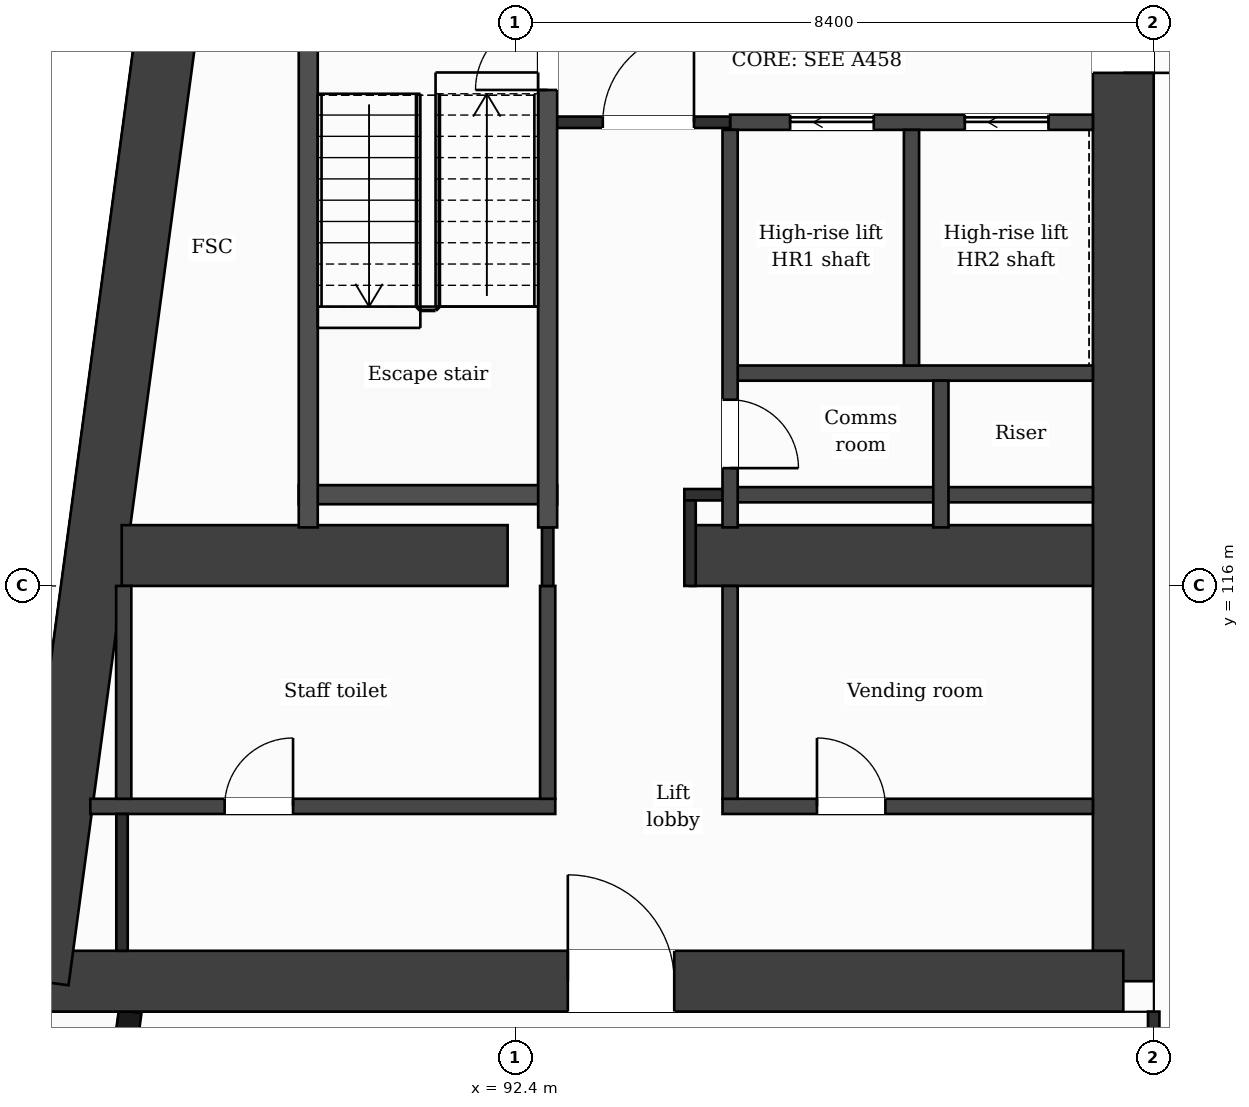
"""IFC4 building model, lengths in metres.
Left out: names, types, materials, properties, quantities, classifications, styles, units other than length and angle.
Written with IfcOpenShell. Run it as: python <this file> out.ifc"""

import sys

from ifc_helpers import new_model, si_unit, direction, frame, frame_2d, origin, place, context, subcontext, project, spatial, rectangle, extrude, element, fill, save


model = new_model("IFC4")
c1 = context("Model", 3, precision=1e-05, world=origin(), true_north=direction((0.0, 1.0)))
c2 = subcontext(c1, "Body", "Model", "MODEL_VIEW")
j1 = project(units=[si_unit("LENGTHUNIT", "METRE"), si_unit("PLANEANGLEUNIT", "RADIAN")], contexts=[c1])
p1 = place(None, origin())
s1 = spatial("IfcSite", under=j1, at=p1, CompositionType="ELEMENT")
p2 = place(p1, origin())
s2 = spatial("IfcBuilding", under=s1, at=p2, CompositionType="ELEMENT")
p3 = place(p2, frame((0.0, 0.0, 235.5)))
s3 = spatial("IfcBuildingStorey", under=s2, at=p3, CompositionType="ELEMENT", Elevation=235.5)
p4 = place(p3, frame((100.4, 132.0, 0.0), z_axis=(0.0, 0.0, 1.0), x_axis=(0.0, -1.0, 0.0)))
e1 = element("IfcWall", 1, at=p4, inside=s3, PredefinedType="SHEAR", context=c2, shape_type="SweptSolid", body=[
    extrude(rectangle(XDim=21.2, YDim=0.8, at=frame_2d((10.6, 0.0))), origin(), (0.0, 0.0, 1.0), 3.7),
])
p5 = place(p4, frame((7.85, 0.0, 0.0)))
e2 = element("IfcOpeningElement", 2, at=p5, cuts=e1, PredefinedType="OPENING", context=c2, shape_type="SweptSolid", body=[
    extrude(rectangle(XDim=1.4, YDim=2.1, at=frame_2d((0.7, 1.05))), frame((0.0, 0.41, 0.0), z_axis=(0.0, -1.0, 0.0), x_axis=(1.0, 0.0, 0.0)), (0.0, 0.0, 1.0), 0.82),
])
p6 = place(p3, frame((100.4, 110.8, 0.0), z_axis=(0.0, 0.0, 1.0), x_axis=(-1.0, 0.0, 0.0)))
e3 = element("IfcWall", 3, at=p6, inside=s3, PredefinedType="SHEAR", context=c2, shape_type="SweptSolid", body=[
    extrude(rectangle(XDim=14.273, YDim=0.8, at=frame_2d((7.137, 0.0))), origin(), (0.0, 0.0, 1.0), 3.7),
])
p7 = place(p6, frame((5.908, 0.0, 0.0)))
e4 = element("IfcOpeningElement", 4, at=p7, cuts=e3, PredefinedType="OPENING", context=c2, shape_type="SweptSolid", body=[
    extrude(rectangle(XDim=1.4, YDim=2.1, at=frame_2d((0.7, 1.05))), frame((0.0, 0.41, 0.0), z_axis=(0.0, -1.0, 0.0), x_axis=(1.0, 0.0, 0.0)), (0.0, 0.0, 1.0), 0.82),
])
p8 = place(p3, frame((86.127, 110.8, 0.0), z_axis=(0.0, 0.0, 1.0), x_axis=(0.133408347329, 0.991061154956, 0.0)))
e5 = element("IfcWall", 5, at=p8, inside=s3, PredefinedType="SHEAR", context=c2, shape_type="SweptSolid", body=[
    extrude(rectangle(XDim=21.391, YDim=0.8, at=frame_2d((10.696, 0.0))), origin(), (0.0, 0.0, 1.0), 3.7),
])
p9 = place(p3, frame((87.223, 116.4, 0.0), z_axis=(0.0, 0.0, 1.0), x_axis=(1.0, 0.0, 0.0)))
e6 = element("IfcWall", 6, at=p9, inside=s3, PredefinedType="SHEAR", context=c2, shape_type="SweptSolid", body=[
    extrude(rectangle(XDim=5.077, YDim=0.8, at=frame_2d((2.539, 0.0))), origin(), (0.0, 0.0, 1.0), 3.7),
])
p10 = place(p3, frame((94.7, 116.4, 0.0), z_axis=(0.0, 0.0, 1.0), x_axis=(1.0, 0.0, 0.0)))
e7 = element("IfcWall", 7, at=p10, inside=s3, PredefinedType="SHEAR", context=c2, shape_type="SweptSolid", body=[
    extrude(rectangle(XDim=5.3, YDim=0.8, at=frame_2d((2.65, 0.0))), origin(), (0.0, 0.0, 1.0), 3.7),
])
p11 = place(p3, frame((87.334, 110.4, 0.0), z_axis=(0.0, 0.0, 1.0), x_axis=(-0.133437175554, -0.991057273915, 0.0)))
e8 = element("IfcWall", 8, at=p11, inside=s3, PredefinedType="SOLIDWALL", context=c2, shape_type="SweptSolid", body=[
    extrude(rectangle(XDim=6.781, YDim=0.3, at=frame_2d((3.39, 0.0))), origin(), (0.0, 0.0, 1.0), 3.38),
])
p12 = place(p11, frame((1.418, 0.0, 0.0)))
e9 = element("IfcOpeningElement", 9, at=p12, cuts=e8, PredefinedType="OPENING", context=c2, shape_type="SweptSolid", body=[
    extrude(rectangle(XDim=1.2, YDim=2.4, at=frame_2d((0.6, 1.2))), frame((0.0, 0.16, 0.0), z_axis=(0.0, -1.0, 0.0), x_axis=(1.0, 0.0, 0.0)), (0.0, 0.0, 1.0), 0.32),
])
p13 = place(p11, frame((4.758, 0.0, 0.9)))
e10 = element("IfcOpeningElement", 10, at=p13, cuts=e8, PredefinedType="OPENING", context=c2, shape_type="SweptSolid", body=[
    extrude(rectangle(XDim=1.2, YDim=2.1, at=frame_2d((0.6, 1.05))), frame((0.0, 0.16, 0.0), z_axis=(0.0, -1.0, 0.0), x_axis=(1.0, 0.0, 0.0)), (0.0, 0.0, 1.0), 0.32),
])
p14 = place(p3, frame((86.81, 113.1, 0.0), z_axis=(0.0, 0.0, 1.0), x_axis=(1.0, 0.0, 0.0)))
e11 = element("IfcWall", 11, at=p14, inside=s3, PredefinedType="PARTITIONING", context=c2, shape_type="SweptSolid", body=[
    extrude(rectangle(XDim=6.117, YDim=0.2, at=frame_2d((3.059, 0.0))), origin(), (0.0, 0.0, 1.0), 3.38),
])
p15 = place(p14, frame((1.767, 0.0, 0.0)))
e12 = element("IfcOpeningElement", 12, at=p15, cuts=e11, PredefinedType="OPENING", context=c2, shape_type="SweptSolid", body=[
    extrude(rectangle(XDim=0.9, YDim=2.1, at=frame_2d((0.45, 1.05))), frame((0.0, 0.11, 0.0), z_axis=(0.0, -1.0, 0.0), x_axis=(1.0, 0.0, 0.0)), (0.0, 0.0, 1.0), 0.22),
])
p16 = place(p3, frame((95.127, 113.1, 0.0), z_axis=(0.0, 0.0, 1.0), x_axis=(1.0, 0.0, 0.0)))
e13 = element("IfcWall", 13, at=p16, inside=s3, PredefinedType="PARTITIONING", context=c2, shape_type="SweptSolid", body=[
    extrude(rectangle(XDim=4.873, YDim=0.2, at=frame_2d((2.437, 0.0))), origin(), (0.0, 0.0, 1.0), 3.38),
])
p17 = place(p16, frame((1.243, 0.0, 0.0)))
e14 = element("IfcOpeningElement", 14, at=p17, cuts=e13, PredefinedType="OPENING", context=c2, shape_type="SweptSolid", body=[
    extrude(rectangle(XDim=0.9, YDim=2.1, at=frame_2d((0.45, 1.05))), frame((0.0, 0.11, 0.0), z_axis=(0.0, -1.0, 0.0), x_axis=(1.0, 0.0, 0.0)), (0.0, 0.0, 1.0), 0.22),
])
p18 = place(p3, frame((95.227, 117.2, 0.0), z_axis=(0.0, 0.0, 1.0), x_axis=(1.0, 0.0, 0.0)))
e15 = element("IfcWall", 15, at=p18, inside=s3, PredefinedType="PARTITIONING", context=c2, shape_type="SweptSolid", body=[
    extrude(rectangle(XDim=4.773, YDim=0.2, at=frame_2d((2.386, 0.0))), origin(), (0.0, 0.0, 1.0), 3.38),
])
p19 = place(p3, frame((94.625, 117.2, 0.0), z_axis=(0.0, 0.0, 1.0), x_axis=(1.0, 0.0, 0.0)))
e16 = element("IfcWall", 16, at=p19, inside=s3, PredefinedType="PARTITIONING", context=c2, shape_type="SweptSolid", body=[
    extrude(rectangle(XDim=0.602, YDim=0.15, at=frame_2d((0.301, 0.0))), origin(), (0.0, 0.0, 1.0), 3.38),
])
p20 = place(p3, frame((89.552, 117.2, 0.0), z_axis=(0.0, 0.0, 1.0), x_axis=(1.0, 0.0, 0.0)))
e17 = element("IfcWall", 17, at=p20, inside=s3, PredefinedType="PARTITIONING", context=c2, shape_type="SweptSolid", body=[
    extrude(rectangle(XDim=3.4, YDim=0.25, at=frame_2d((1.7, 0.0))), origin(), (0.0, 0.0, 1.0), 3.38),
])
p21 = place(p3, frame((95.227, 118.8, 0.0), z_axis=(0.0, 0.0, 1.0), x_axis=(1.0, 0.0, 0.0)))
e18 = element("IfcWall", 18, at=p21, inside=s3, PredefinedType="PARTITIONING", context=c2, shape_type="SweptSolid", body=[
    extrude(rectangle(XDim=4.773, YDim=0.2, at=frame_2d((2.386, 0.0))), origin(), (0.0, 0.0, 1.0), 3.38),
])
p22 = place(p3, frame((95.227, 122.1, 0.0), z_axis=(0.0, 0.0, 1.0), x_axis=(1.0, 0.0, 0.0)))
e19 = element("IfcWall", 19, at=p22, inside=s3, PredefinedType="PARTITIONING", context=c2, shape_type="SweptSolid", body=[
    extrude(rectangle(XDim=4.773, YDim=0.2, at=frame_2d((2.386, 0.0))), origin(), (0.0, 0.0, 1.0), 3.38),
])
p23 = place(p22, frame((0.79, 0.0, 0.0)))
e20 = element("IfcOpeningElement", 20, at=p23, cuts=e19, PredefinedType="OPENING", context=c2, shape_type="SweptSolid", body=[
    extrude(rectangle(XDim=1.1, YDim=2.1, at=frame_2d((0.55, 1.05))), frame((0.0, 0.11, 0.0), z_axis=(0.0, -1.0, 0.0), x_axis=(1.0, 0.0, 0.0)), (0.0, 0.0, 1.0), 0.22),
])
p24 = place(p22, frame((3.088, 0.0, 0.0)))
e21 = element("IfcOpeningElement", 21, at=p24, cuts=e19, PredefinedType="OPENING", context=c2, shape_type="SweptSolid", body=[
    extrude(rectangle(XDim=1.1, YDim=2.1, at=frame_2d((0.55, 1.05))), frame((0.0, 0.11, 0.0), z_axis=(0.0, -1.0, 0.0), x_axis=(1.0, 0.0, 0.0)), (0.0, 0.0, 1.0), 0.22),
])
p25 = place(p3, frame((92.827, 122.1, 0.0), z_axis=(0.0, 0.0, 1.0), x_axis=(1.0, 0.0, 0.0)))
e22 = element("IfcWall", 22, at=p25, inside=s3, PredefinedType="PARTITIONING", context=c2, shape_type="SweptSolid", body=[
    extrude(rectangle(XDim=2.4, YDim=0.15, at=frame_2d((1.2, 0.0))), origin(), (0.0, 0.0, 1.0), 3.38),
])
p26 = place(p25, frame((0.725, 0.0, 0.0)))
e23 = element("IfcOpeningElement", 23, at=p26, cuts=e22, PredefinedType="OPENING", context=c2, shape_type="SweptSolid", body=[
    extrude(rectangle(XDim=1.2, YDim=2.1, at=frame_2d((0.6, 1.05))), frame((0.0, 0.085, 0.0), z_axis=(0.0, -1.0, 0.0), x_axis=(1.0, 0.0, 0.0)), (0.0, 0.0, 1.0), 0.17),
])
p27 = place(p3, frame((87.25, 113.2, 0.0), z_axis=(0.0, 0.0, 1.0), x_axis=(0.0, 1.0, 0.0)))
e24 = element("IfcWall", 24, at=p27, inside=s3, PredefinedType="PARTITIONING", context=c2, shape_type="SweptSolid", body=[
    extrude(rectangle(XDim=2.8, YDim=0.2, at=frame_2d((1.4, 0.0))), origin(), (0.0, 0.0, 1.0), 3.38),
])
p28 = place(p3, frame((87.227, 111.2, 0.0), z_axis=(0.0, 0.0, 1.0), x_axis=(0.0, 1.0, 0.0)))
e25 = element("IfcWall", 25, at=p28, inside=s3, PredefinedType="PARTITIONING", context=c2, shape_type="SweptSolid", body=[
    extrude(rectangle(XDim=1.8, YDim=0.15, at=frame_2d((0.9, 0.0))), origin(), (0.0, 0.0, 1.0), 3.38),
])
p29 = place(p3, frame((89.677, 116.77, 0.0), z_axis=(0.0, 0.0, 1.0), x_axis=(0.0, 1.0, 0.0)))
e26 = element("IfcWall", 26, at=p29, inside=s3, PredefinedType="PARTITIONING", context=c2, shape_type="SweptSolid", body=[
    extrude(rectangle(XDim=7.055, YDim=0.25, at=frame_2d((3.527, 0.0))), origin(), (0.0, 0.0, 1.0), 3.38),
])
p30 = place(p3, frame((92.827, 113.2, 0.0), z_axis=(0.0, 0.0, 1.0), x_axis=(0.0, 1.0, 0.0)))
e27 = element("IfcWall", 27, at=p30, inside=s3, PredefinedType="PARTITIONING", context=c2, shape_type="SweptSolid", body=[
    extrude(rectangle(XDim=2.8, YDim=0.2, at=frame_2d((1.4, 0.0))), origin(), (0.0, 0.0, 1.0), 3.38),
])
p31 = place(p3, frame((92.827, 116.0, 0.0), z_axis=(0.0, 0.0, 1.0), x_axis=(0.0, 1.0, 0.0)))
e28 = element("IfcWall", 28, at=p31, inside=s3, PredefinedType="PARTITIONING", context=c2, shape_type="SweptSolid", body=[
    extrude(rectangle(XDim=0.77, YDim=0.15, at=frame_2d((0.385, 0.0))), origin(), (0.0, 0.0, 1.0), 3.38),
])
p32 = place(p3, frame((92.827, 116.77, 0.0), z_axis=(0.0, 0.0, 1.0), x_axis=(0.0, 1.0, 0.0)))
e29 = element("IfcWall", 29, at=p32, inside=s3, PredefinedType="PARTITIONING", context=c2, shape_type="SweptSolid", body=[
    extrude(rectangle(XDim=7.055, YDim=0.25, at=frame_2d((3.527, 0.0))), origin(), (0.0, 0.0, 1.0), 3.38),
])
p33 = place(p32, frame((5.755, 0.0, 0.0)))
e30 = element("IfcOpeningElement", 30, at=p33, cuts=e29, PredefinedType="OPENING", context=c2, shape_type="SweptSolid", body=[
    extrude(rectangle(XDim=0.95, YDim=2.1, at=frame_2d((0.475, 1.05))), frame((0.0, 0.135, 0.0), z_axis=(0.0, -1.0, 0.0), x_axis=(1.0, 0.0, 0.0)), (0.0, 0.0, 1.0), 0.27),
])
p34 = place(p3, frame((94.7, 116.0, 0.0), z_axis=(0.0, 0.0, 1.0), x_axis=(0.0, 1.0, 0.0)))
e31 = element("IfcWall", 31, at=p34, inside=s3, PredefinedType="PARTITIONING", context=c2, shape_type="SweptSolid", body=[
    extrude(rectangle(XDim=1.125, YDim=0.15, at=frame_2d((0.562, 0.0))), origin(), (0.0, 0.0, 1.0), 3.38),
])
p35 = place(p3, frame((95.227, 113.2, 0.0), z_axis=(0.0, 0.0, 1.0), x_axis=(0.0, 1.0, 0.0)))
e32 = element("IfcWall", 32, at=p35, inside=s3, PredefinedType="PARTITIONING", context=c2, shape_type="SweptSolid", body=[
    extrude(rectangle(XDim=2.8, YDim=0.2, at=frame_2d((1.4, 0.0))), origin(), (0.0, 0.0, 1.0), 3.38),
])
p36 = place(p3, frame((95.227, 116.77, 0.0), z_axis=(0.0, 0.0, 1.0), x_axis=(0.0, 1.0, 0.0)))
e33 = element("IfcWall", 33, at=p36, inside=s3, PredefinedType="PARTITIONING", context=c2, shape_type="SweptSolid", body=[
    extrude(rectangle(XDim=5.23, YDim=0.2, at=frame_2d((2.615, 0.0))), origin(), (0.0, 0.0, 1.0), 3.38),
])
p37 = place(p36, frame((0.78, 0.0, 0.0)))
e34 = element("IfcOpeningElement", 34, at=p37, cuts=e33, PredefinedType="OPENING", context=c2, shape_type="SweptSolid", body=[
    extrude(rectangle(XDim=0.9, YDim=2.1, at=frame_2d((0.45, 1.05))), frame((0.0, 0.11, 0.0), z_axis=(0.0, -1.0, 0.0), x_axis=(1.0, 0.0, 0.0)), (0.0, 0.0, 1.0), 0.22),
])
p38 = place(p3, frame((97.614, 118.9, 0.0), z_axis=(0.0, 0.0, 1.0), x_axis=(0.0, 1.0, 0.0)))
e35 = element("IfcWall", 35, at=p38, inside=s3, PredefinedType="PARTITIONING", context=c2, shape_type="SweptSolid", body=[
    extrude(rectangle(XDim=3.1, YDim=0.2, at=frame_2d((1.55, 0.0))), origin(), (0.0, 0.0, 1.0), 3.38),
])
p39 = place(p3, frame((98.0, 116.77, 0.0), z_axis=(0.0, 0.0, 1.0), x_axis=(0.0, 1.0, 0.0)))
e36 = element("IfcWall", 36, at=p39, inside=s3, PredefinedType="PARTITIONING", context=c2, shape_type="SweptSolid", body=[
    extrude(rectangle(XDim=1.93, YDim=0.2, at=frame_2d((0.965, 0.0))), origin(), (0.0, 0.0, 1.0), 3.38),
])
p40 = place(p3, frame((100.8, 109.075, 0.0), z_axis=(0.0, 0.0, 1.0), x_axis=(0.0, 1.0, 0.0)))
e37 = element("IfcWall", 37, at=p40, inside=s3, PredefinedType="PARTITIONING", context=c2, shape_type="SweptSolid", body=[
    extrude(rectangle(XDim=1.325, YDim=0.15, at=frame_2d((0.663, 0.0))), origin(), (0.0, 0.0, 1.0), 3.38),
])
p41 = place(p26, origin())
e38 = element("IfcDoor", 38, at=p41, inside=s3, OperationType="SINGLE_SWING_RIGHT", PredefinedType="DOOR", context=c2, shape_type="SweptSolid", body=[
    extrude(rectangle(XDim=1.2, YDim=2.1, at=frame_2d((0.6, 1.05))), frame((0.0, 0.025, 0.0), z_axis=(0.0, -1.0, 0.0), x_axis=(1.0, 0.0, 0.0)), (0.0, 0.0, 1.0), 0.05),
])
fill(e23, e38)
p42 = place(p23, origin())
e39 = element("IfcDoor", 39, at=p42, inside=s3, OperationType="SLIDING_TO_LEFT", PredefinedType="DOOR", context=c2, shape_type="SweptSolid", body=[
    extrude(rectangle(XDim=1.1, YDim=2.1, at=frame_2d((0.55, 1.05))), frame((0.0, 0.025, 0.0), z_axis=(0.0, -1.0, 0.0), x_axis=(1.0, 0.0, 0.0)), (0.0, 0.0, 1.0), 0.05),
])
fill(e20, e39)
p43 = place(p24, origin())
e40 = element("IfcDoor", 40, at=p43, inside=s3, OperationType="SLIDING_TO_LEFT", PredefinedType="DOOR", context=c2, shape_type="SweptSolid", body=[
    extrude(rectangle(XDim=1.1, YDim=2.1, at=frame_2d((0.55, 1.05))), frame((0.0, 0.025, 0.0), z_axis=(0.0, -1.0, 0.0), x_axis=(1.0, 0.0, 0.0)), (0.0, 0.0, 1.0), 0.05),
])
fill(e21, e40)
p44 = place(p33, origin())
e41 = element("IfcDoor", 41, at=p44, inside=s3, OperationType="SINGLE_SWING_LEFT", PredefinedType="DOOR", context=c2, shape_type="SweptSolid", body=[
    extrude(rectangle(XDim=0.95, YDim=2.1, at=frame_2d((0.475, 1.05))), frame((0.0, 0.025, 0.0), z_axis=(0.0, -1.0, 0.0), x_axis=(1.0, 0.0, 0.0)), (0.0, 0.0, 1.0), 0.05),
])
fill(e30, e41)
p45 = place(p37, origin())
e42 = element("IfcDoor", 42, at=p45, inside=s3, OperationType="SINGLE_SWING_LEFT", PredefinedType="DOOR", context=c2, shape_type="SweptSolid", body=[
    extrude(rectangle(XDim=0.9, YDim=2.1, at=frame_2d((0.45, 1.05))), frame((0.0, 0.025, 0.0), z_axis=(0.0, -1.0, 0.0), x_axis=(1.0, 0.0, 0.0)), (0.0, 0.0, 1.0), 0.05),
])
fill(e34, e42)
p46 = place(p15, origin())
e43 = element("IfcDoor", 43, at=p46, inside=s3, OperationType="SINGLE_SWING_RIGHT", PredefinedType="DOOR", context=c2, shape_type="SweptSolid", body=[
    extrude(rectangle(XDim=0.9, YDim=2.1, at=frame_2d((0.45, 1.05))), frame((0.0, 0.025, 0.0), z_axis=(0.0, -1.0, 0.0), x_axis=(1.0, 0.0, 0.0)), (0.0, 0.0, 1.0), 0.05),
])
fill(e12, e43)
p47 = place(p17, origin())
e44 = element("IfcDoor", 44, at=p47, inside=s3, OperationType="SINGLE_SWING_LEFT", PredefinedType="DOOR", context=c2, shape_type="SweptSolid", body=[
    extrude(rectangle(XDim=0.9, YDim=2.1, at=frame_2d((0.45, 1.05))), frame((0.0, 0.025, 0.0), z_axis=(0.0, -1.0, 0.0), x_axis=(1.0, 0.0, 0.0)), (0.0, 0.0, 1.0), 0.05),
])
fill(e14, e44)
p48 = place(p7, origin())
e45 = element("IfcDoor", 45, at=p48, inside=s3, OperationType="SINGLE_SWING_RIGHT", PredefinedType="DOOR", context=c2, shape_type="SweptSolid", body=[
    extrude(rectangle(XDim=1.4, YDim=2.1, at=frame_2d((0.7, 1.05))), frame((0.0, 0.025, 0.0), z_axis=(0.0, -1.0, 0.0), x_axis=(1.0, 0.0, 0.0)), (0.0, 0.0, 1.0), 0.05),
])
fill(e4, e45)
p49 = place(p5, origin())
e46 = element("IfcDoor", 46, at=p49, inside=s3, OperationType="SINGLE_SWING_RIGHT", PredefinedType="DOOR", context=c2, shape_type="SweptSolid", body=[
    extrude(rectangle(XDim=1.4, YDim=2.1, at=frame_2d((0.7, 1.05))), frame((0.0, 0.025, 0.0), z_axis=(0.0, -1.0, 0.0), x_axis=(1.0, 0.0, 0.0)), (0.0, 0.0, 1.0), 0.05),
])
fill(e2, e46)
save(model, sys.argv[1])
